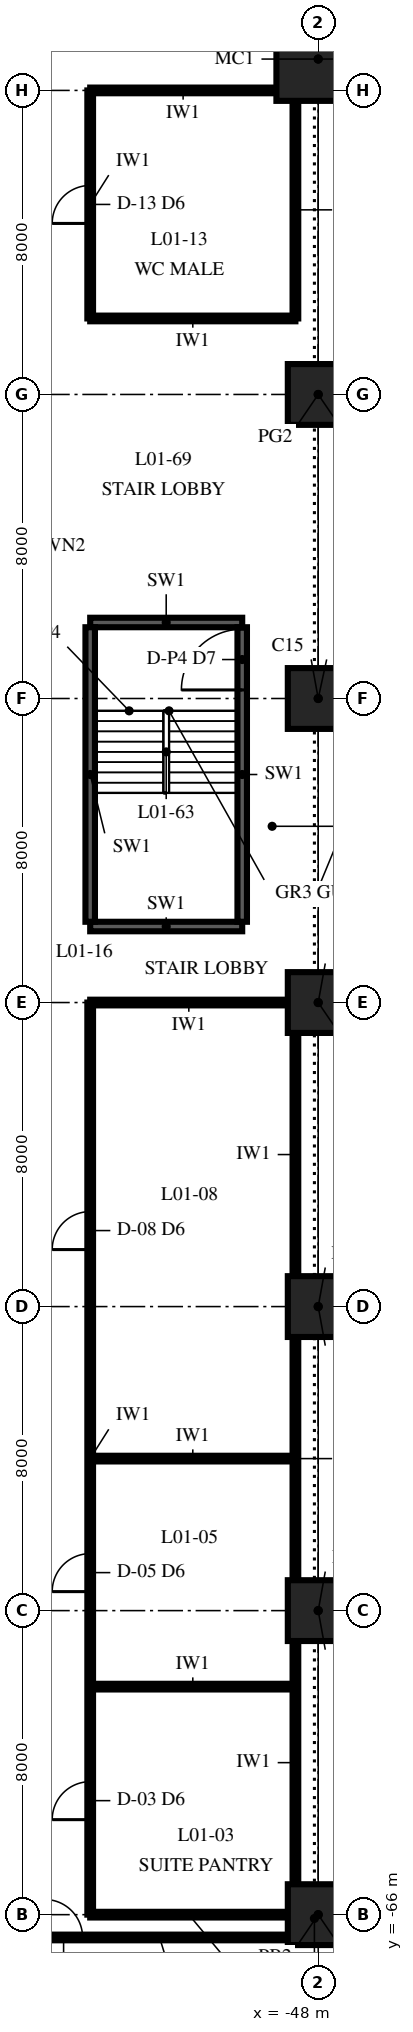
"""IFC4 building model, lengths in metres.
Left out: names, types, materials, properties, quantities, classifications, styles, units other than length and angle.
Written with IfcOpenShell. Run it as: python <this file> out.ifc"""

import sys

from ifc_helpers import new_model, si_unit, direction, frame, frame_2d, origin, origin_2d, place, context, subcontext, project, spatial, rectangle, extrude, element, fill, save


model = new_model("IFC4")
c1 = context("Model", 3, precision=1e-05, world=origin(), true_north=direction((0.0, 1.0)))
c2 = subcontext(c1, "Body", "Model", "MODEL_VIEW")
j1 = project(units=[si_unit("LENGTHUNIT", "METRE"), si_unit("PLANEANGLEUNIT", "RADIAN")], contexts=[c1])
p1 = place(None, origin())
s1 = spatial("IfcSite", under=j1, at=p1, CompositionType="ELEMENT")
p2 = place(p1, origin())
s2 = spatial("IfcBuilding", under=s1, at=p2, CompositionType="ELEMENT")
p3 = place(p2, frame((0.0, 0.0, 6.0)))
s3 = spatial("IfcBuildingStorey", under=s2, at=p3, CompositionType="ELEMENT", Elevation=6.0)
for number, where, z_axis, x_axis in (
    (1, (-48.0, -66.0, 0.0), (0.0, 0.0, 1.0), (1.0, 0.0, 0.0)),
    (2, (-48.0, -58.0, 0.0), (0.0, 0.0, 1.0), (1.0, 0.0, 0.0)),
    (3, (-48.0, -50.0, 0.0), (0.0, 0.0, 1.0), (1.0, 0.0, 0.0)),
    (4, (-48.0, -42.0, 0.0), (0.0, 0.0, 1.0), (1.0, 0.0, 0.0)),
    (5, (-48.0, -34.0, 0.0), (0.0, 0.0, 1.0), (1.0, 0.0, 0.0)),
    (6, (-48.0, -26.0, 0.0), (0.0, 0.0, 1.0), (1.0, 0.0, 0.0)),
):
    element("IfcColumn", number, at=place(p3, frame(where, z_axis=z_axis, x_axis=x_axis)), inside=s3, PredefinedType="COLUMN", context=c2, shape_type="SweptSolid", body=[
        extrude(rectangle(XDim=1.6, YDim=1.6, at=origin_2d()), origin(), (0.0, 0.0, 1.0), 6.0),
    ])
p4 = place(p3, frame((-48.0, -17.175, 0.0), z_axis=(0.0, 0.0, 1.0), x_axis=(1.0, 0.0, 0.0)))
e7 = element("IfcColumn", 7, at=p4, inside=s3, PredefinedType="COLUMN", context=c2, shape_type="SweptSolid", body=[
    extrude(rectangle(XDim=2.2, YDim=2.2, at=origin_2d()), origin(), (0.0, 0.0, 1.0), 6.0),
])
for number, where, z_axis, x_axis in (
    (8, (-54.0, -40.0, 0.0), (0.0, 0.0, 1.0), (1.0, 0.0, 0.0)),
    (9, (-50.0, -32.0, 0.0), (0.0, 0.0, 1.0), (-1.0, 0.0, 0.0)),
):
    element("IfcWall", number, at=place(p3, frame(where, z_axis=z_axis, x_axis=x_axis)), inside=s3, PredefinedType="SOLIDWALL", context=c2, shape_type="SweptSolid", body=[
        extrude(rectangle(XDim=4.0, YDim=0.25, at=frame_2d((2.0, 0.0))), origin(), (0.0, 0.0, 1.0), 6.0),
    ])
p5 = place(p3, frame((-50.0, -39.875, 0.0), z_axis=(0.0, 0.0, 1.0), x_axis=(0.0, 1.0, 0.0)))
e10 = element("IfcWall", 10, at=p5, inside=s3, PredefinedType="SOLIDWALL", context=c2, shape_type="SweptSolid", body=[
    extrude(rectangle(XDim=7.75, YDim=0.25, at=frame_2d((3.875, 0.0))), origin(), (0.0, 0.0, 1.0), 6.0),
])
p6 = place(p5, frame((6.1, 0.0, 0.0)))
e11 = element("IfcOpeningElement", 11, at=p6, cuts=e10, PredefinedType="OPENING", context=c2, shape_type="SweptSolid", body=[
    extrude(rectangle(XDim=1.6, YDim=2.1, at=frame_2d((0.8, 1.05))), frame((0.0, 0.14, 0.0), z_axis=(0.0, -1.0, 0.0), x_axis=(1.0, 0.0, 0.0)), (0.0, 0.0, 1.0), 0.28),
])
p7 = place(p3, frame((-54.0, -32.125, 0.0), z_axis=(0.0, 0.0, 1.0), x_axis=(0.0, -1.0, 0.0)))
e12 = element("IfcWall", 12, at=p7, inside=s3, PredefinedType="SOLIDWALL", context=c2, shape_type="SweptSolid", body=[
    extrude(rectangle(XDim=7.75, YDim=0.25, at=frame_2d((3.875, 0.0))), origin(), (0.0, 0.0, 1.0), 6.0),
])
p8 = place(p3, frame((-54.0, -66.0, 0.0), z_axis=(0.0, 0.0, 1.0), x_axis=(0.0, 1.0, 0.0)))
e13 = element("IfcWall", 13, at=p8, inside=s3, PredefinedType="PARTITIONING", context=c2, shape_type="SweptSolid", body=[
    extrude(rectangle(XDim=24.0, YDim=0.15, at=frame_2d((12.0, 0.0))), origin(), (0.0, 0.0, 1.0), 5.7),
])
p9 = place(p8, frame((2.5, 0.0, 0.0)))
e14 = element("IfcOpeningElement", 14, at=p9, cuts=e13, PredefinedType="OPENING", context=c2, shape_type="SweptSolid", body=[
    extrude(rectangle(XDim=1.0, YDim=2.1, at=frame_2d((0.5, 1.05))), frame((0.0, 0.09, 0.0), z_axis=(0.0, -1.0, 0.0), x_axis=(1.0, 0.0, 0.0)), (0.0, 0.0, 1.0), 0.18),
])
p10 = place(p8, frame((8.5, 0.0, 0.0)))
e15 = element("IfcOpeningElement", 15, at=p10, cuts=e13, PredefinedType="OPENING", context=c2, shape_type="SweptSolid", body=[
    extrude(rectangle(XDim=1.0, YDim=2.1, at=frame_2d((0.5, 1.05))), frame((0.0, 0.09, 0.0), z_axis=(0.0, -1.0, 0.0), x_axis=(1.0, 0.0, 0.0)), (0.0, 0.0, 1.0), 0.18),
])
p11 = place(p8, frame((17.5, 0.0, 0.0)))
e16 = element("IfcOpeningElement", 16, at=p11, cuts=e13, PredefinedType="OPENING", context=c2, shape_type="SweptSolid", body=[
    extrude(rectangle(XDim=1.0, YDim=2.1, at=frame_2d((0.5, 1.05))), frame((0.0, 0.09, 0.0), z_axis=(0.0, -1.0, 0.0), x_axis=(1.0, 0.0, 0.0)), (0.0, 0.0, 1.0), 0.18),
])
p12 = place(p3, frame((-54.0, -24.0, 0.0), z_axis=(0.0, 0.0, 1.0), x_axis=(0.0, 1.0, 0.0)))
e17 = element("IfcWall", 17, at=p12, inside=s3, PredefinedType="PARTITIONING", context=c2, shape_type="SweptSolid", body=[
    extrude(rectangle(XDim=6.0, YDim=0.15, at=frame_2d((3.0, 0.0))), origin(), (0.0, 0.0, 1.0), 5.7),
])
p13 = place(p12, frame((2.5, 0.0, 0.0)))
e18 = element("IfcOpeningElement", 18, at=p13, cuts=e17, PredefinedType="OPENING", context=c2, shape_type="SweptSolid", body=[
    extrude(rectangle(XDim=1.0, YDim=2.1, at=frame_2d((0.5, 1.05))), frame((0.0, 0.09, 0.0), z_axis=(0.0, -1.0, 0.0), x_axis=(1.0, 0.0, 0.0)), (0.0, 0.0, 1.0), 0.18),
])
for number, where, z_axis, x_axis in (
    (19, (-48.6, -65.19, 0.0), (0.0, 0.0, 1.0), (0.0, 1.0, 0.0)),
    (20, (-48.6, -57.19, 0.0), (0.0, 0.0, 1.0), (0.0, 1.0, 0.0)),
    (21, (-48.6, -49.19, 0.0), (0.0, 0.0, 1.0), (0.0, 1.0, 0.0)),
):
    element("IfcWall", number, at=place(p3, frame(where, z_axis=z_axis, x_axis=x_axis)), inside=s3, PredefinedType="PARTITIONING", context=c2, shape_type="SweptSolid", body=[
        extrude(rectangle(XDim=6.38, YDim=0.15, at=frame_2d((3.19, 0.0))), origin(), (0.0, 0.0, 1.0), 5.7),
    ])
p14 = place(p3, frame((-48.6, -24.0, 0.0), z_axis=(0.0, 0.0, 1.0), x_axis=(0.0, 1.0, 0.0)))
e22 = element("IfcWall", 22, at=p14, inside=s3, PredefinedType="PARTITIONING", context=c2, shape_type="SweptSolid", body=[
    extrude(rectangle(XDim=5.715, YDim=0.15, at=frame_2d((2.857, 0.0))), origin(), (0.0, 0.0, 1.0), 5.7),
])
p15 = place(p3, frame((-55.54, -66.6, 0.0), z_axis=(0.0, 0.0, 1.0), x_axis=(1.0, 0.0, 0.0)))
e23 = element("IfcWall", 23, at=p15, inside=s3, PredefinedType="PARTITIONING", context=c2, shape_type="SweptSolid", body=[
    extrude(rectangle(XDim=6.73, YDim=0.15, at=frame_2d((3.365, 0.0))), origin(), (0.0, 0.0, 1.0), 5.05),
])
p16 = place(p15, frame((0.34, 0.0, 0.0)))
e24 = element("IfcOpeningElement", 24, at=p16, cuts=e23, PredefinedType="OPENING", context=c2, shape_type="SweptSolid", body=[
    extrude(rectangle(XDim=1.0, YDim=2.1, at=frame_2d((0.5, 1.05))), frame((0.0, 0.09, 0.0), z_axis=(0.0, -1.0, 0.0), x_axis=(1.0, 0.0, 0.0)), (0.0, 0.0, 1.0), 0.18),
])
p17 = place(p3, frame((-54.0, -66.0, 0.0), z_axis=(0.0, 0.0, 1.0), x_axis=(1.0, 0.0, 0.0)))
e25 = element("IfcWall", 25, at=p17, inside=s3, PredefinedType="PARTITIONING", context=c2, shape_type="SweptSolid", body=[
    extrude(rectangle(XDim=5.19, YDim=0.15, at=frame_2d((2.595, 0.0))), origin(), (0.0, 0.0, 1.0), 5.05),
])
for number, where, z_axis, x_axis in (
    (26, (-54.0, -60.0, 0.0), (0.0, 0.0, 1.0), (1.0, 0.0, 0.0)),
    (27, (-54.0, -54.0, 0.0), (0.0, 0.0, 1.0), (1.0, 0.0, 0.0)),
):
    element("IfcWall", number, at=place(p3, frame(where, z_axis=z_axis, x_axis=x_axis)), inside=s3, PredefinedType="PARTITIONING", context=c2, shape_type="SweptSolid", body=[
        extrude(rectangle(XDim=5.4, YDim=0.15, at=frame_2d((2.7, 0.0))), origin(), (0.0, 0.0, 1.0), 5.7),
    ])
p18 = place(p3, frame((-54.0, -42.0, 0.0), z_axis=(0.0, 0.0, 1.0), x_axis=(1.0, 0.0, 0.0)))
e28 = element("IfcWall", 28, at=p18, inside=s3, PredefinedType="PARTITIONING", context=c2, shape_type="SweptSolid", body=[
    extrude(rectangle(XDim=5.19, YDim=0.15, at=frame_2d((2.595, 0.0))), origin(), (0.0, 0.0, 1.0), 4.1),
])
p19 = place(p3, frame((-54.0, -24.0, 0.0), z_axis=(0.0, 0.0, 1.0), x_axis=(1.0, 0.0, 0.0)))
e29 = element("IfcWall", 29, at=p19, inside=s3, PredefinedType="PARTITIONING", context=c2, shape_type="SweptSolid", body=[
    extrude(rectangle(XDim=5.4, YDim=0.15, at=frame_2d((2.7, 0.0))), origin(), (0.0, 0.0, 1.0), 5.7),
])
p20 = place(p3, frame((-54.0, -18.0, 0.0), z_axis=(0.0, 0.0, 1.0), x_axis=(1.0, 0.0, 0.0)))
e30 = element("IfcWall", 30, at=p20, inside=s3, PredefinedType="PARTITIONING", context=c2, shape_type="SweptSolid", body=[
    extrude(rectangle(XDim=4.89, YDim=0.15, at=frame_2d((2.445, 0.0))), origin(), (0.0, 0.0, 1.0), 5.7),
])
p21 = place(p6, origin())
e31 = element("IfcDoor", 31, at=p21, inside=s3, OperationType="DOUBLE_DOOR_SINGLE_SWING", PredefinedType="DOOR", context=c2, shape_type="SweptSolid", body=[
    extrude(rectangle(XDim=1.6, YDim=2.1, at=frame_2d((0.8, 1.05))), frame((0.0, 0.125, 0.0), z_axis=(0.0, -1.0, 0.0), x_axis=(1.0, 0.0, 0.0)), (0.0, 0.0, 1.0), 0.25),
])
fill(e11, e31)
p22 = place(p9, origin())
e32 = element("IfcDoor", 32, at=p22, inside=s3, OperationType="SINGLE_SWING_LEFT", PredefinedType="DOOR", context=c2, shape_type="SweptSolid", body=[
    extrude(rectangle(XDim=1.0, YDim=2.1, at=frame_2d((0.5, 1.05))), frame((0.0, 0.075, 0.0), z_axis=(0.0, -1.0, 0.0), x_axis=(1.0, 0.0, 0.0)), (0.0, 0.0, 1.0), 0.149),
])
fill(e14, e32)
p23 = place(p10, origin())
e33 = element("IfcDoor", 33, at=p23, inside=s3, OperationType="SINGLE_SWING_LEFT", PredefinedType="DOOR", context=c2, shape_type="SweptSolid", body=[
    extrude(rectangle(XDim=1.0, YDim=2.1, at=frame_2d((0.5, 1.05))), frame((0.0, 0.075, 0.0), z_axis=(0.0, -1.0, 0.0), x_axis=(1.0, 0.0, 0.0)), (0.0, 0.0, 1.0), 0.149),
])
fill(e15, e33)
p24 = place(p11, origin())
e34 = element("IfcDoor", 34, at=p24, inside=s3, OperationType="SINGLE_SWING_LEFT", PredefinedType="DOOR", context=c2, shape_type="SweptSolid", body=[
    extrude(rectangle(XDim=1.0, YDim=2.1, at=frame_2d((0.5, 1.05))), frame((0.0, 0.075, 0.0), z_axis=(0.0, -1.0, 0.0), x_axis=(1.0, 0.0, 0.0)), (0.0, 0.0, 1.0), 0.149),
])
fill(e16, e34)
p25 = place(p13, origin())
e35 = element("IfcDoor", 35, at=p25, inside=s3, OperationType="SINGLE_SWING_LEFT", PredefinedType="DOOR", context=c2, shape_type="SweptSolid", body=[
    extrude(rectangle(XDim=1.0, YDim=2.1, at=frame_2d((0.5, 1.05))), frame((0.0, 0.075, 0.0), z_axis=(0.0, -1.0, 0.0), x_axis=(1.0, 0.0, 0.0)), (0.0, 0.0, 1.0), 0.149),
])
fill(e18, e35)
p26 = place(p16, origin())
e36 = element("IfcDoor", 36, at=p26, inside=s3, OperationType="SINGLE_SWING_LEFT", PredefinedType="DOOR", context=c2, shape_type="SweptSolid", body=[
    extrude(rectangle(XDim=1.0, YDim=2.1, at=frame_2d((0.5, 1.05))), frame((0.0, 0.075, 0.0), z_axis=(0.0, -1.0, 0.0), x_axis=(1.0, 0.0, 0.0)), (0.0, 0.0, 1.0), 0.149),
])
fill(e24, e36)
save(model, sys.argv[1])
